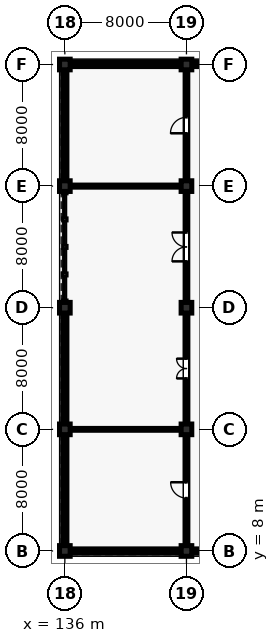
"""IFC4 building model, lengths in metres.
Left out: names, types, materials, properties, quantities, classifications, styles, units other than length and angle.
Written with IfcOpenShell. Run it as: python <this file> out.ifc"""

import sys

from ifc_helpers import new_model, si_unit, direction, frame, frame_2d, origin, origin_2d, place, context, subcontext, project, spatial, rectangle, extrude, element, fill, save


model = new_model("IFC4")
c1 = context("Model", 3, precision=1e-05, world=origin(), true_north=direction((0.0, 1.0)))
c2 = subcontext(c1, "Body", "Model", "MODEL_VIEW")
j1 = project(units=[si_unit("LENGTHUNIT", "METRE"), si_unit("PLANEANGLEUNIT", "RADIAN")], contexts=[c1])
p1 = place(None, origin())
s1 = spatial("IfcSite", under=j1, at=p1, CompositionType="ELEMENT")
p2 = place(p1, origin())
s2 = spatial("IfcBuilding", under=s1, at=p2, CompositionType="ELEMENT")
p3 = place(p2, origin())
s3 = spatial("IfcBuildingStorey", under=s2, at=p3, CompositionType="ELEMENT", Elevation=0.0)
for number, where, z_axis, x_axis in (
    (1, (136.0, 8.0, 0.0), (0.0, 0.0, 1.0), (1.0, 0.0, 0.0)),
    (2, (136.0, 16.0, 0.0), (0.0, 0.0, 1.0), (1.0, 0.0, 0.0)),
    (3, (136.0, 24.0, 0.0), (0.0, 0.0, 1.0), (1.0, 0.0, 0.0)),
    (4, (136.0, 32.0, 0.0), (0.0, 0.0, 1.0), (1.0, 0.0, 0.0)),
    (5, (136.0, 40.0, 0.0), (0.0, 0.0, 1.0), (1.0, 0.0, 0.0)),
    (6, (144.0, 8.0, 0.0), (0.0, 0.0, 1.0), (1.0, 0.0, 0.0)),
    (7, (144.0, 16.0, 0.0), (0.0, 0.0, 1.0), (1.0, 0.0, 0.0)),
    (8, (144.0, 24.0, 0.0), (0.0, 0.0, 1.0), (1.0, 0.0, 0.0)),
    (9, (144.0, 32.0, 0.0), (0.0, 0.0, 1.0), (1.0, 0.0, 0.0)),
    (10, (144.0, 40.0, 0.0), (0.0, 0.0, 1.0), (1.0, 0.0, 0.0)),
):
    element("IfcColumn", number, at=place(p3, frame(where, z_axis=z_axis, x_axis=x_axis)), inside=s3, PredefinedType="COLUMN", context=c2, shape_type="SweptSolid", body=[
        extrude(rectangle(XDim=0.7, YDim=0.7, at=origin_2d()), origin(), (0.0, 0.0, 1.0), 5.28),
    ])
p4 = place(p3, frame((136.335, 8.0, 0.0), z_axis=(0.0, 0.0, 1.0), x_axis=(1.0, 0.0, 0.0)))
e11 = element("IfcWall", 11, at=p4, inside=s3, PredefinedType="SOLIDWALL", context=c2, shape_type="SweptSolid", body=[
    extrude(rectangle(XDim=7.33, YDim=0.27, at=frame_2d((3.665, 0.0))), origin(), (0.0, 0.0, 1.0), 4.614),
])
p5 = place(p4, frame((2.74, 0.0, 0.9)))
e12 = element("IfcOpeningElement", 12, at=p5, cuts=e11, PredefinedType="OPENING", context=c2, shape_type="SweptSolid", body=[
    extrude(rectangle(XDim=1.85, YDim=2.65, at=frame_2d((0.925, 1.325))), frame((0.0, 0.145, 0.0), z_axis=(0.0, -1.0, 0.0), x_axis=(1.0, 0.0, 0.0)), (0.0, 0.0, 1.0), 0.29),
])
p6 = place(p3, frame((136.0, 8.335, 0.0), z_axis=(0.0, 0.0, 1.0), x_axis=(0.0, 1.0, 0.0)))
e13 = element("IfcWall", 13, at=p6, inside=s3, PredefinedType="SOLIDWALL", context=c2, shape_type="SweptSolid", body=[
    extrude(rectangle(XDim=7.33, YDim=0.27, at=frame_2d((3.665, 0.0))), origin(), (0.0, 0.0, 1.0), 4.614),
])
p7 = place(p6, frame((2.74, 0.0, 0.9)))
e14 = element("IfcOpeningElement", 14, at=p7, cuts=e13, PredefinedType="OPENING", context=c2, shape_type="SweptSolid", body=[
    extrude(rectangle(XDim=1.85, YDim=2.65, at=frame_2d((0.925, 1.325))), frame((0.0, 0.145, 0.0), z_axis=(0.0, -1.0, 0.0), x_axis=(1.0, 0.0, 0.0)), (0.0, 0.0, 1.0), 0.29),
])
p8 = place(p3, frame((136.0, 16.335, 0.0), z_axis=(0.0, 0.0, 1.0), x_axis=(0.0, 1.0, 0.0)))
e15 = element("IfcWall", 15, at=p8, inside=s3, PredefinedType="SOLIDWALL", context=c2, shape_type="SweptSolid", body=[
    extrude(rectangle(XDim=7.33, YDim=0.27, at=frame_2d((3.665, 0.0))), origin(), (0.0, 0.0, 1.0), 4.677),
])
p9 = place(p8, frame((2.515, 0.0, 0.9)))
e16 = element("IfcOpeningElement", 16, at=p9, cuts=e15, PredefinedType="OPENING", context=c2, shape_type="SweptSolid", body=[
    extrude(rectangle(XDim=2.3, YDim=2.55, at=frame_2d((1.15, 1.275))), frame((0.0, 0.145, 0.0), z_axis=(0.0, -1.0, 0.0), x_axis=(1.0, 0.0, 0.0)), (0.0, 0.0, 1.0), 0.29),
])
p10 = place(p3, frame((136.335, 40.0, 0.0), z_axis=(0.0, 0.0, 1.0), x_axis=(1.0, 0.0, 0.0)))
e17 = element("IfcWall", 17, at=p10, inside=s3, PredefinedType="SOLIDWALL", context=c2, shape_type="SweptSolid", body=[
    extrude(rectangle(XDim=7.33, YDim=0.27, at=frame_2d((3.665, 0.0))), origin(), (0.0, 0.0, 1.0), 4.614),
])
p11 = place(p10, frame((2.59, 0.0, 0.9)))
e18 = element("IfcOpeningElement", 18, at=p11, cuts=e17, PredefinedType="OPENING", context=c2, shape_type="SweptSolid", body=[
    extrude(rectangle(XDim=2.15, YDim=2.8, at=frame_2d((1.075, 1.4))), frame((0.0, 0.145, 0.0), z_axis=(0.0, -1.0, 0.0), x_axis=(1.0, 0.0, 0.0)), (0.0, 0.0, 1.0), 0.29),
])
p12 = place(p3, frame((136.0, 32.335, 0.0), z_axis=(0.0, 0.0, 1.0), x_axis=(0.0, 1.0, 0.0)))
e19 = element("IfcWall", 19, at=p12, inside=s3, PredefinedType="SOLIDWALL", context=c2, shape_type="SweptSolid", body=[
    extrude(rectangle(XDim=7.33, YDim=0.27, at=frame_2d((3.665, 0.0))), origin(), (0.0, 0.0, 1.0), 4.674),
])
p13 = place(p12, frame((2.59, 0.0, 0.9)))
e20 = element("IfcOpeningElement", 20, at=p13, cuts=e19, PredefinedType="OPENING", context=c2, shape_type="SweptSolid", body=[
    extrude(rectangle(XDim=2.15, YDim=2.8, at=frame_2d((1.075, 1.4))), frame((0.0, 0.145, 0.0), z_axis=(0.0, -1.0, 0.0), x_axis=(1.0, 0.0, 0.0)), (0.0, 0.0, 1.0), 0.29),
])
p14 = place(p3, frame((144.335, 8.0, 0.0), z_axis=(0.0, 0.0, 1.0), x_axis=(1.0, 0.0, 0.0)))
e21 = element("IfcWall", 21, at=p14, inside=s3, PredefinedType="SOLIDWALL", context=c2, shape_type="SweptSolid", body=[
    extrude(rectangle(XDim=7.33, YDim=0.27, at=frame_2d((3.665, 0.0))), origin(), (0.0, 0.0, 1.0), 4.677),
])
p15 = place(p14, frame((0.644, 0.0, 0.95)))
e22 = element("IfcOpeningElement", 22, at=p15, cuts=e21, PredefinedType="OPENING", context=c2, shape_type="SweptSolid", body=[
    extrude(rectangle(XDim=1.35, YDim=1.9, at=frame_2d((0.675, 0.95))), frame((0.0, 0.145, 0.0), z_axis=(0.0, -1.0, 0.0), x_axis=(1.0, 0.0, 0.0)), (0.0, 0.0, 1.0), 0.29),
])
p16 = place(p14, frame((5.336, 0.0, 0.95)))
e23 = element("IfcOpeningElement", 23, at=p16, cuts=e21, PredefinedType="OPENING", context=c2, shape_type="SweptSolid", body=[
    extrude(rectangle(XDim=1.35, YDim=1.9, at=frame_2d((0.675, 0.95))), frame((0.0, 0.145, 0.0), z_axis=(0.0, -1.0, 0.0), x_axis=(1.0, 0.0, 0.0)), (0.0, 0.0, 1.0), 0.29),
])
p17 = place(p3, frame((144.335, 40.0, 0.0), z_axis=(0.0, 0.0, 1.0), x_axis=(1.0, 0.0, 0.0)))
e24 = element("IfcWall", 24, at=p17, inside=s3, PredefinedType="SOLIDWALL", context=c2, shape_type="SweptSolid", body=[
    extrude(rectangle(XDim=7.33, YDim=0.27, at=frame_2d((3.665, 0.0))), origin(), (0.0, 0.0, 1.0), 4.677),
])
p18 = place(p17, frame((0.744, 0.0, 0.95)))
e25 = element("IfcOpeningElement", 25, at=p18, cuts=e24, PredefinedType="OPENING", context=c2, shape_type="SweptSolid", body=[
    extrude(rectangle(XDim=1.15, YDim=1.65, at=frame_2d((0.575, 0.825))), frame((0.0, 0.145, 0.0), z_axis=(0.0, -1.0, 0.0), x_axis=(1.0, 0.0, 0.0)), (0.0, 0.0, 1.0), 0.29),
])
p19 = place(p17, frame((5.436, 0.0, 0.95)))
e26 = element("IfcOpeningElement", 26, at=p19, cuts=e24, PredefinedType="OPENING", context=c2, shape_type="SweptSolid", body=[
    extrude(rectangle(XDim=1.15, YDim=1.65, at=frame_2d((0.575, 0.825))), frame((0.0, 0.145, 0.0), z_axis=(0.0, -1.0, 0.0), x_axis=(1.0, 0.0, 0.0)), (0.0, 0.0, 1.0), 0.29),
])
p20 = place(p3, frame((144.0, 8.34, 0.0), z_axis=(0.0, 0.0, 1.0), x_axis=(0.0, 1.0, 0.0)))
e27 = element("IfcWall", 27, at=p20, inside=s3, PredefinedType="PARTITIONING", context=c2, shape_type="SweptSolid", body=[
    extrude(rectangle(XDim=7.32, YDim=0.185, at=frame_2d((3.66, 0.0))), origin(), (0.0, 0.0, 1.0), 4.471),
])
p21 = place(p20, frame((3.14, 0.0, 0.0)))
e28 = element("IfcOpeningElement", 28, at=p21, cuts=e27, PredefinedType="OPENING", context=c2, shape_type="SweptSolid", body=[
    extrude(rectangle(XDim=1.04, YDim=2.18, at=frame_2d((0.52, 1.09))), frame((0.0, 0.103, 0.0), z_axis=(0.0, -1.0, 0.0), x_axis=(1.0, 0.0, 0.0)), (0.0, 0.0, 1.0), 0.205),
])
p22 = place(p3, frame((136.34, 16.0, 0.0), z_axis=(0.0, 0.0, 1.0), x_axis=(1.0, 0.0, 0.0)))
e29 = element("IfcWall", 29, at=p22, inside=s3, PredefinedType="PARTITIONING", context=c2, shape_type="SweptSolid", body=[
    extrude(rectangle(XDim=7.32, YDim=0.12, at=frame_2d((3.66, 0.0))), origin(), (0.0, 0.0, 1.0), 4.404),
])
p23 = place(p3, frame((144.0, 16.34, 0.0), z_axis=(0.0, 0.0, 1.0), x_axis=(0.0, 1.0, 0.0)))
e30 = element("IfcWall", 30, at=p23, inside=s3, PredefinedType="PARTITIONING", context=c2, shape_type="SweptSolid", body=[
    extrude(rectangle(XDim=7.32, YDim=0.185, at=frame_2d((3.66, 0.0))), origin(), (0.0, 0.0, 1.0), 4.603),
])
p24 = place(p23, frame((3.01, 0.0, 0.0)))
e31 = element("IfcOpeningElement", 31, at=p24, cuts=e30, PredefinedType="OPENING", context=c2, shape_type="SweptSolid", body=[
    extrude(rectangle(XDim=1.3, YDim=2.2, at=frame_2d((0.65, 1.1))), frame((0.0, 0.103, 0.0), z_axis=(0.0, -1.0, 0.0), x_axis=(1.0, 0.0, 0.0)), (0.0, 0.0, 1.0), 0.205),
])
p25 = place(p3, frame((144.0, 24.34, 0.0), z_axis=(0.0, 0.0, 1.0), x_axis=(0.0, 1.0, 0.0)))
e32 = element("IfcWall", 32, at=p25, inside=s3, PredefinedType="PARTITIONING", context=c2, shape_type="SweptSolid", body=[
    extrude(rectangle(XDim=7.32, YDim=0.175, at=frame_2d((3.66, 0.0))), origin(), (0.0, 0.0, 1.0), 4.667),
])
p26 = place(p25, frame((2.71, 0.0, 0.0)))
e33 = element("IfcOpeningElement", 33, at=p26, cuts=e32, PredefinedType="OPENING", context=c2, shape_type="SweptSolid", body=[
    extrude(rectangle(XDim=1.9, YDim=2.38, at=frame_2d((0.95, 1.19))), frame((0.0, 0.097, 0.0), z_axis=(0.0, -1.0, 0.0), x_axis=(1.0, 0.0, 0.0)), (0.0, 0.0, 1.0), 0.195),
])
p27 = place(p3, frame((136.34, 32.0, 0.0), z_axis=(0.0, 0.0, 1.0), x_axis=(1.0, 0.0, 0.0)))
e34 = element("IfcWall", 34, at=p27, inside=s3, PredefinedType="PARTITIONING", context=c2, shape_type="SweptSolid", body=[
    extrude(rectangle(XDim=7.32, YDim=0.135, at=frame_2d((3.66, 0.0))), origin(), (0.0, 0.0, 1.0), 4.403),
])
p28 = place(p3, frame((144.0, 32.34, 0.0), z_axis=(0.0, 0.0, 1.0), x_axis=(0.0, 1.0, 0.0)))
e35 = element("IfcWall", 35, at=p28, inside=s3, PredefinedType="PARTITIONING", context=c2, shape_type="SweptSolid", body=[
    extrude(rectangle(XDim=7.32, YDim=0.175, at=frame_2d((3.66, 0.0))), origin(), (0.0, 0.0, 1.0), 4.404),
])
p29 = place(p28, frame((3.135, 0.0, 0.0)))
e36 = element("IfcOpeningElement", 36, at=p29, cuts=e35, PredefinedType="OPENING", context=c2, shape_type="SweptSolid", body=[
    extrude(rectangle(XDim=1.05, YDim=2.15, at=frame_2d((0.525, 1.075))), frame((0.0, 0.097, 0.0), z_axis=(0.0, -1.0, 0.0), x_axis=(1.0, 0.0, 0.0)), (0.0, 0.0, 1.0), 0.195),
])
p30 = place(p5, origin())
e37 = element("IfcWindow", 37, at=p30, inside=s3, PartitioningType="SINGLE_PANEL", PredefinedType="WINDOW", context=c2, shape_type="SweptSolid", body=[
    extrude(rectangle(XDim=1.85, YDim=2.65, at=frame_2d((0.925, 1.325))), frame((0.0, 0.03, 0.0), z_axis=(0.0, -1.0, 0.0), x_axis=(1.0, 0.0, 0.0)), (0.0, 0.0, 1.0), 0.06),
])
fill(e12, e37)
p31 = place(p7, origin())
e38 = element("IfcWindow", 38, at=p31, inside=s3, PartitioningType="SINGLE_PANEL", PredefinedType="WINDOW", context=c2, shape_type="SweptSolid", body=[
    extrude(rectangle(XDim=1.85, YDim=2.65, at=frame_2d((0.925, 1.325))), frame((0.0, 0.03, 0.0), z_axis=(0.0, -1.0, 0.0), x_axis=(1.0, 0.0, 0.0)), (0.0, 0.0, 1.0), 0.06),
])
fill(e14, e38)
p32 = place(p9, origin())
e39 = element("IfcWindow", 39, at=p32, inside=s3, PartitioningType="SINGLE_PANEL", PredefinedType="WINDOW", context=c2, shape_type="SweptSolid", body=[
    extrude(rectangle(XDim=2.3, YDim=2.55, at=frame_2d((1.15, 1.275))), frame((0.0, 0.03, 0.0), z_axis=(0.0, -1.0, 0.0), x_axis=(1.0, 0.0, 0.0)), (0.0, 0.0, 1.0), 0.06),
])
fill(e16, e39)
p33 = place(p11, origin())
e40 = element("IfcWindow", 40, at=p33, inside=s3, PartitioningType="SINGLE_PANEL", PredefinedType="WINDOW", context=c2, shape_type="SweptSolid", body=[
    extrude(rectangle(XDim=2.15, YDim=2.8, at=frame_2d((1.075, 1.4))), frame((0.0, 0.03, 0.0), z_axis=(0.0, -1.0, 0.0), x_axis=(1.0, 0.0, 0.0)), (0.0, 0.0, 1.0), 0.06),
])
fill(e18, e40)
p34 = place(p13, origin())
e41 = element("IfcWindow", 41, at=p34, inside=s3, PartitioningType="SINGLE_PANEL", PredefinedType="WINDOW", context=c2, shape_type="SweptSolid", body=[
    extrude(rectangle(XDim=2.15, YDim=2.8, at=frame_2d((1.075, 1.4))), frame((0.0, 0.03, 0.0), z_axis=(0.0, -1.0, 0.0), x_axis=(1.0, 0.0, 0.0)), (0.0, 0.0, 1.0), 0.06),
])
fill(e20, e41)
p35 = place(p21, origin())
e42 = element("IfcDoor", 42, at=p35, inside=s3, OperationType="SINGLE_SWING_RIGHT", PredefinedType="DOOR", context=c2, shape_type="SweptSolid", body=[
    extrude(rectangle(XDim=1.04, YDim=2.18, at=frame_2d((0.52, 1.09))), frame((0.0, 0.025, 0.0), z_axis=(0.0, -1.0, 0.0), x_axis=(1.0, 0.0, 0.0)), (0.0, 0.0, 1.0), 0.05),
])
fill(e28, e42)
p36 = place(p24, origin())
e43 = element("IfcDoor", 43, at=p36, inside=s3, OperationType="DOUBLE_DOOR_SINGLE_SWING", PredefinedType="DOOR", context=c2, shape_type="SweptSolid", body=[
    extrude(rectangle(XDim=1.3, YDim=2.2, at=frame_2d((0.65, 1.1))), frame((0.0, 0.025, 0.0), z_axis=(0.0, -1.0, 0.0), x_axis=(1.0, 0.0, 0.0)), (0.0, 0.0, 1.0), 0.05),
])
fill(e31, e43)
p37 = place(p26, origin())
e44 = element("IfcDoor", 44, at=p37, inside=s3, OperationType="DOUBLE_DOOR_SINGLE_SWING", PredefinedType="DOOR", context=c2, shape_type="SweptSolid", body=[
    extrude(rectangle(XDim=1.9, YDim=2.38, at=frame_2d((0.95, 1.19))), frame((0.0, 0.025, 0.0), z_axis=(0.0, -1.0, 0.0), x_axis=(1.0, 0.0, 0.0)), (0.0, 0.0, 1.0), 0.05),
])
fill(e33, e44)
p38 = place(p29, origin())
e45 = element("IfcDoor", 45, at=p38, inside=s3, OperationType="SINGLE_SWING_LEFT", PredefinedType="DOOR", context=c2, shape_type="SweptSolid", body=[
    extrude(rectangle(XDim=1.05, YDim=2.15, at=frame_2d((0.525, 1.075))), frame((0.0, 0.025, 0.0), z_axis=(0.0, -1.0, 0.0), x_axis=(1.0, 0.0, 0.0)), (0.0, 0.0, 1.0), 0.05),
])
fill(e36, e45)
save(model, sys.argv[1])
